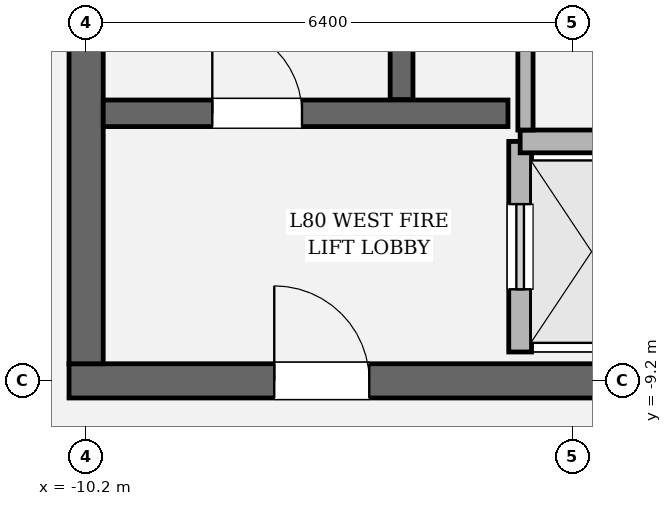
"""IFC4 building model, lengths in metres.
Left out: names, types, materials, properties, quantities, classifications, styles, units other than length and angle.
Written with IfcOpenShell. Run it as: python <this file> out.ifc"""

import sys

from ifc_helpers import new_model, si_unit, direction, frame, frame_2d, origin, place, context, subcontext, project, spatial, rectangle, extrude, element, fill, save


model = new_model("IFC4")
c1 = context("Model", 3, precision=1e-05, world=origin(), true_north=direction((0.0, 1.0)))
c2 = subcontext(c1, "Body", "Model", "MODEL_VIEW")
j1 = project(units=[si_unit("LENGTHUNIT", "METRE"), si_unit("PLANEANGLEUNIT", "RADIAN")], contexts=[c1])
p1 = place(None, origin())
s1 = spatial("IfcSite", under=j1, at=p1, CompositionType="ELEMENT")
p2 = place(p1, origin())
s2 = spatial("IfcBuilding", under=s1, at=p2, CompositionType="ELEMENT")
p3 = place(p2, frame((0.0, 0.0, 339.0)))
s3 = spatial("IfcBuildingStorey", under=s2, at=p3, CompositionType="ELEMENT", Elevation=339.0)
p4 = place(p3, frame((10.425, -9.2, 0.0), z_axis=(0.0, 0.0, 1.0), x_axis=(-1.0, 0.0, 0.0)))
e1 = element("IfcWall", 1, at=p4, inside=s3, PredefinedType="SHEAR", context=c2, shape_type="SweptSolid", body=[
    extrude(rectangle(XDim=20.85, YDim=0.45, at=frame_2d((10.425, 0.0))), origin(), (0.0, 0.0, 1.0), 4.8),
])
p5 = place(p4, frame((2.7, 0.0, 0.0)))
e2 = element("IfcOpeningElement", 2, at=p5, cuts=e1, PredefinedType="OPENING", context=c2, shape_type="SweptSolid", body=[
    extrude(rectangle(XDim=1.25, YDim=2.25, at=frame_2d((0.625, 1.125))), frame((0.0, 0.235, 0.0), z_axis=(0.0, -1.0, 0.0), x_axis=(1.0, 0.0, 0.0)), (0.0, 0.0, 1.0), 0.47),
])
p6 = place(p4, frame((16.9, 0.0, 0.0)))
e3 = element("IfcOpeningElement", 3, at=p6, cuts=e1, PredefinedType="OPENING", context=c2, shape_type="SweptSolid", body=[
    extrude(rectangle(XDim=1.25, YDim=2.25, at=frame_2d((0.625, 1.125))), frame((0.0, 0.235, 0.0), z_axis=(0.0, -1.0, 0.0), x_axis=(1.0, 0.0, 0.0)), (0.0, 0.0, 1.0), 0.47),
])
p7 = place(p4, frame((10.925, 0.0, 0.0)))
e4 = element("IfcOpeningElement", 4, at=p7, cuts=e1, PredefinedType="OPENING", context=c2, shape_type="SweptSolid", body=[
    extrude(rectangle(XDim=1.2, YDim=2.3, at=frame_2d((0.6, 1.15))), frame((0.0, 0.235, 0.0), z_axis=(0.0, -1.0, 0.0), x_axis=(1.0, 0.0, 0.0)), (0.0, 0.0, 1.0), 0.47),
])
p8 = place(p4, frame((8.725, 0.0, 0.0)))
e5 = element("IfcOpeningElement", 5, at=p8, cuts=e1, PredefinedType="OPENING", context=c2, shape_type="SweptSolid", body=[
    extrude(rectangle(XDim=1.2, YDim=2.3, at=frame_2d((0.6, 1.15))), frame((0.0, 0.235, 0.0), z_axis=(0.0, -1.0, 0.0), x_axis=(1.0, 0.0, 0.0)), (0.0, 0.0, 1.0), 0.47),
])
p9 = place(p3, frame((-10.2, -8.975, 0.0), z_axis=(0.0, 0.0, 1.0), x_axis=(0.0, 1.0, 0.0)))
e6 = element("IfcWall", 6, at=p9, inside=s3, PredefinedType="SHEAR", context=c2, shape_type="SweptSolid", body=[
    extrude(rectangle(XDim=17.95, YDim=0.45, at=frame_2d((8.975, 0.0))), origin(), (0.0, 0.0, 1.0), 4.8),
])
p10 = place(p9, frame((12.765, 0.0, 0.0)))
e7 = element("IfcOpeningElement", 7, at=p10, cuts=e6, PredefinedType="OPENING", context=c2, shape_type="SweptSolid", body=[
    extrude(rectangle(XDim=1.18, YDim=2.2, at=frame_2d((0.59, 1.1))), frame((0.0, 0.235, 0.0), z_axis=(0.0, -1.0, 0.0), x_axis=(1.0, 0.0, 0.0)), (0.0, 0.0, 1.0), 0.47),
])
p11 = place(p3, frame((-6.05, -5.5, 0.0), z_axis=(0.0, 0.0, 1.0), x_axis=(0.0, 1.0, 0.0)))
e8 = element("IfcWall", 8, at=p11, inside=s3, PredefinedType="SOLIDWALL", context=c2, shape_type="SweptSolid", body=[
    extrude(rectangle(XDim=8.95, YDim=0.3, at=frame_2d((4.475, 0.0))), origin(), (0.0, 0.0, 1.0), 4.8),
])
p12 = place(p3, frame((-9.975, -5.68, 0.0), z_axis=(0.0, 0.0, 1.0), x_axis=(1.0, 0.0, 0.0)))
e9 = element("IfcWall", 9, at=p12, inside=s3, PredefinedType="SOLIDWALL", context=c2, shape_type="SweptSolid", body=[
    extrude(rectangle(XDim=5.325, YDim=0.35, at=frame_2d((2.663, 0.0))), origin(), (0.0, 0.0, 1.0), 4.8),
])
p13 = place(p12, frame((1.435, 0.0, 0.0)))
e10 = element("IfcOpeningElement", 10, at=p13, cuts=e9, PredefinedType="OPENING", context=c2, shape_type="SweptSolid", body=[
    extrude(rectangle(XDim=1.18, YDim=2.2, at=frame_2d((0.59, 1.1))), frame((0.0, 0.185, 0.0), z_axis=(0.0, -1.0, 0.0), x_axis=(1.0, 0.0, 0.0)), (0.0, 0.0, 1.0), 0.37),
])
p14 = place(p3, frame((-4.49, -8.82, 0.0), z_axis=(0.0, 0.0, 1.0), x_axis=(0.0, 1.0, 0.0)))
e11 = element("IfcWall", 11, at=p14, inside=s3, PredefinedType="SOLIDWALL", context=c2, shape_type="SweptSolid", body=[
    extrude(rectangle(XDim=2.77, YDim=0.3, at=frame_2d((1.385, 0.0))), origin(), (0.0, 0.0, 1.0), 4.52),
])
p15 = place(p14, frame((0.825, 0.0, 0.0)))
e12 = element("IfcOpeningElement", 12, at=p15, cuts=e11, PredefinedType="OPENING", context=c2, shape_type="SweptSolid", body=[
    extrude(rectangle(XDim=1.12, YDim=2.25, at=frame_2d((0.56, 1.125))), frame((0.0, 0.16, 0.0), z_axis=(0.0, -1.0, 0.0), x_axis=(1.0, 0.0, 0.0)), (0.0, 0.0, 1.0), 0.32),
])
p16 = place(p3, frame((-4.49, -6.05, 0.0), z_axis=(0.0, 0.0, 1.0), x_axis=(1.0, 0.0, 0.0)))
e13 = element("IfcWall", 13, at=p16, inside=s3, PredefinedType="SOLIDWALL", context=c2, shape_type="SweptSolid", body=[
    extrude(rectangle(XDim=1.88, YDim=0.3, at=frame_2d((0.94, 0.0))), origin(), (0.0, 0.0, 1.0), 4.52),
])
p17 = place(p3, frame((-4.42, -4.16, 0.0), z_axis=(0.0, 0.0, 1.0), x_axis=(0.0, -1.0, 0.0)))
e14 = element("IfcWall", 14, at=p17, inside=s3, PredefinedType="SOLIDWALL", context=c2, shape_type="SweptSolid", body=[
    extrude(rectangle(XDim=1.74, YDim=0.2, at=frame_2d((0.87, 0.0))), origin(), (0.0, 0.0, 1.0), 4.52),
])
p18 = place(p13, origin())
e15 = element("IfcDoor", 15, at=p18, inside=s3, OperationType="SINGLE_SWING_LEFT", PredefinedType="DOOR", context=c2, shape_type="SweptSolid", body=[
    extrude(rectangle(XDim=1.18, YDim=2.2, at=frame_2d((0.59, 1.1))), frame((0.0, 0.025, 0.0), z_axis=(0.0, -1.0, 0.0), x_axis=(1.0, 0.0, 0.0)), (0.0, 0.0, 1.0), 0.05),
])
fill(e10, e15)
p19 = place(p6, origin())
e16 = element("IfcDoor", 16, at=p19, inside=s3, OperationType="SINGLE_SWING_RIGHT", PredefinedType="DOOR", context=c2, shape_type="SweptSolid", body=[
    extrude(rectangle(XDim=1.25, YDim=2.25, at=frame_2d((0.625, 1.125))), frame((0.0, 0.025, 0.0), z_axis=(0.0, -1.0, 0.0), x_axis=(1.0, 0.0, 0.0)), (0.0, 0.0, 1.0), 0.05),
])
fill(e3, e16)
p20 = place(p15, origin())
e17 = element("IfcDoor", 17, at=p20, inside=s3, OperationType="SLIDING_TO_LEFT", PredefinedType="DOOR", context=c2, shape_type="SweptSolid", body=[
    extrude(rectangle(XDim=1.12, YDim=2.25, at=frame_2d((0.56, 1.125))), frame((0.0, 0.025, 0.0), z_axis=(0.0, -1.0, 0.0), x_axis=(1.0, 0.0, 0.0)), (0.0, 0.0, 1.0), 0.05),
])
fill(e12, e17)
save(model, sys.argv[1])
